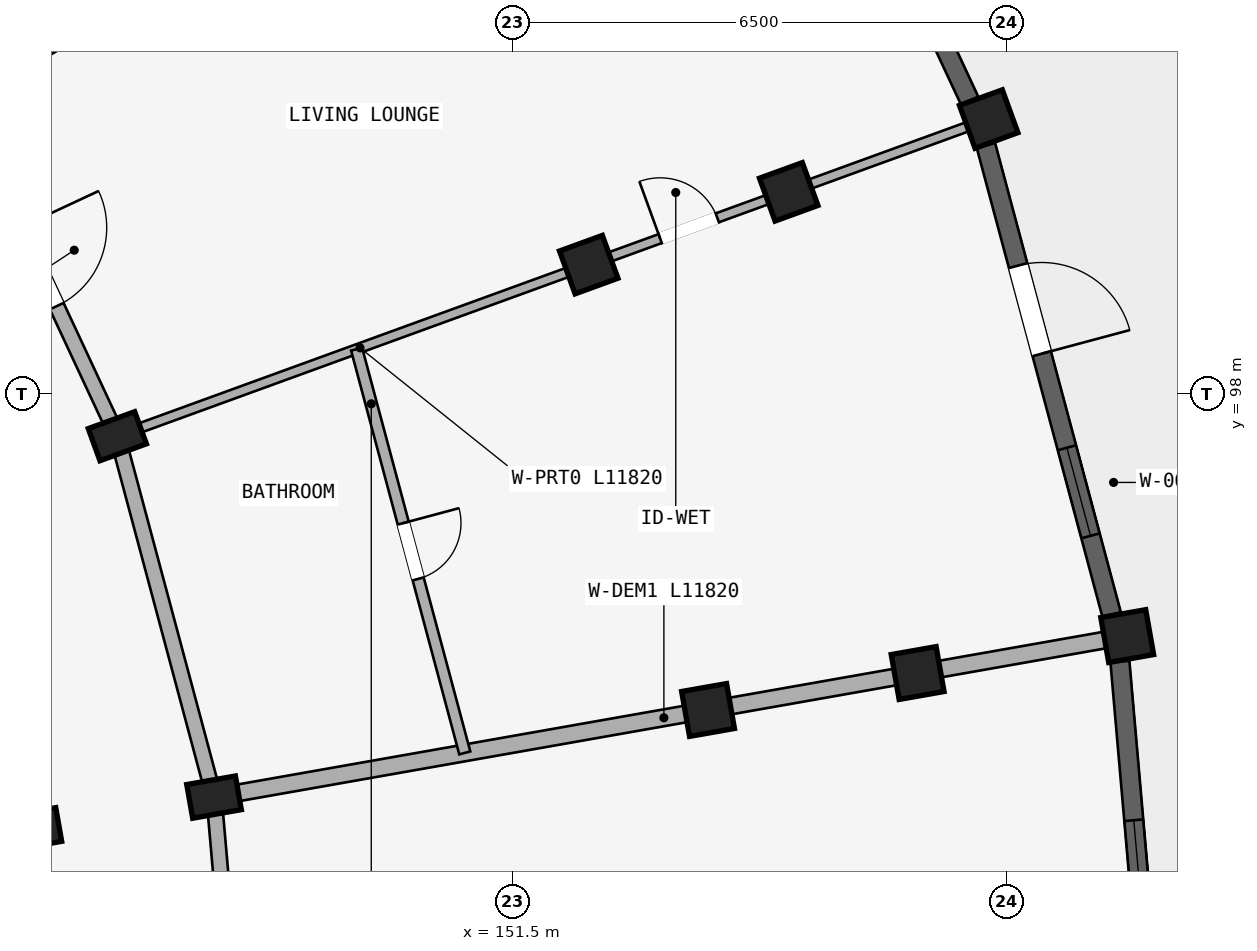
"""IFC4 building model, lengths in metres.
Left out: names, types, materials, properties, quantities, classifications, styles, units other than length and angle.
Written with IfcOpenShell. Run it as: python <this file> out.ifc"""

import sys

from ifc_helpers import new_model, si_unit, direction, frame, frame_2d, origin, origin_2d, place, context, subcontext, project, spatial, rectangle, extrude, element, fill, save


model = new_model("IFC4")
c1 = context("Model", 3, precision=1e-05, world=origin(), true_north=direction((0.0, 1.0)))
c2 = subcontext(c1, "Body", "Model", "MODEL_VIEW")
j1 = project(units=[si_unit("LENGTHUNIT", "METRE"), si_unit("PLANEANGLEUNIT", "RADIAN")], contexts=[c1])
p1 = place(None, origin())
s1 = spatial("IfcSite", under=j1, at=p1, CompositionType="ELEMENT")
p2 = place(p1, origin())
s2 = spatial("IfcBuilding", under=s1, at=p2, CompositionType="ELEMENT")
p3 = place(p2, frame((0.0, 0.0, 33.9)))
s3 = spatial("IfcBuildingStorey", under=s2, at=p3, CompositionType="ELEMENT", Elevation=33.9)
p4 = place(p3, frame((146.299, 97.445, 0.0), z_axis=(0.0, 0.0, 1.0), x_axis=(-0.342020143326, 0.939692620786, 0.0)))
e1 = element("IfcColumn", 1, at=p4, inside=s3, PredefinedType="COLUMN", context=c2, shape_type="SweptSolid", body=[
    extrude(rectangle(XDim=0.45, YDim=0.65, at=origin_2d()), origin(), (0.0, 0.0, 1.0), 2.93),
])
for number, where, z_axis, x_axis in (
    (2, (152.501, 99.702, 0.0), (0.0, 0.0, 1.0), (-0.342, 0.94, 0.0)),
    (3, (155.132, 100.66, 0.0), (0.0, 0.0, 1.0), (-0.342, 0.94, 0.0)),
):
    element("IfcColumn", number, at=place(p3, frame(where, z_axis=z_axis, x_axis=x_axis)), inside=s3, PredefinedType="COLUMN", context=c2, shape_type="SweptSolid", body=[
        extrude(rectangle(XDim=0.6, YDim=0.6, at=origin_2d()), origin(), (0.0, 0.0, 1.0), 2.93),
    ])
p5 = place(p3, frame((157.764, 101.618, 0.0), z_axis=(0.0, 0.0, 1.0), x_axis=(-0.342020143326, 0.939692620786, 0.0)))
e4 = element("IfcColumn", 4, at=p5, inside=s3, PredefinedType="COLUMN", context=c2, shape_type="SweptSolid", body=[
    extrude(rectangle(XDim=0.6, YDim=0.6, at=origin_2d()), origin(), (0.0, 0.0, 1.0), 2.97),
])
for number, where, z_axis, x_axis in (
    (5, (145.208, 92.28, 0.0), (0.0, 0.0, 1.0), (-0.174, 0.985, 0.0)),
    (6, (147.572, 92.697, 0.0), (0.0, 0.0, 1.0), (-0.174, 0.985, 0.0)),
):
    element("IfcColumn", number, at=place(p3, frame(where, z_axis=z_axis, x_axis=x_axis)), inside=s3, PredefinedType="COLUMN", context=c2, shape_type="SweptSolid", body=[
        extrude(rectangle(XDim=0.45, YDim=0.65, at=origin_2d()), origin(), (0.0, 0.0, 1.0), 2.93),
    ])
for number, where, z_axis, x_axis in (
    (7, (154.071, 93.843, 0.0), (0.0, 0.0, 1.0), (-0.174, 0.985, 0.0)),
    (8, (156.829, 94.329, 0.0), (0.0, 0.0, 1.0), (-0.174, 0.985, 0.0)),
):
    element("IfcColumn", number, at=place(p3, frame(where, z_axis=z_axis, x_axis=x_axis)), inside=s3, PredefinedType="COLUMN", context=c2, shape_type="SweptSolid", body=[
        extrude(rectangle(XDim=0.6, YDim=0.6, at=origin_2d()), origin(), (0.0, 0.0, 1.0), 2.93),
    ])
p6 = place(p3, frame((159.586, 94.815, 0.0), z_axis=(0.0, 0.0, 1.0), x_axis=(-0.173648177667, 0.984807753012, 0.0)))
e9 = element("IfcColumn", 9, at=p6, inside=s3, PredefinedType="COLUMN", context=c2, shape_type="SweptSolid", body=[
    extrude(rectangle(XDim=0.6, YDim=0.6, at=origin_2d()), origin(), (0.0, 0.0, 1.0), 2.97),
])
p7 = place(p3, frame((144.222, 101.9, 0.0), z_axis=(0.0, 0.0, 1.0), x_axis=(0.422629854778, -0.906302381024, 0.0)))
e10 = element("IfcWall", 10, at=p7, inside=s3, PredefinedType="STANDARD", context=c2, shape_type="SweptSolid", body=[
    extrude(rectangle(XDim=4.915, YDim=0.2, at=frame_2d((2.458, 0.0))), origin(), (0.0, 0.0, 1.0), 2.372),
])
p8 = place(p7, frame((1.888, 0.0, 0.0)))
e11 = element("IfcOpeningElement", 11, at=p8, cuts=e10, PredefinedType="OPENING", context=c2, shape_type="SweptSolid", body=[
    extrude(rectangle(XDim=1.14, YDim=2.15, at=frame_2d((0.57, 1.075))), frame((0.0, 0.11, 0.0), z_axis=(0.0, -1.0, 0.0), x_axis=(1.0, 0.0, 0.0)), (0.0, 0.0, 1.0), 0.22),
])
p9 = place(p3, frame((146.299, 97.445, 0.0), z_axis=(0.0, 0.0, 1.0), x_axis=(0.258803112091, -0.965930095386, 0.0)))
e12 = element("IfcWall", 12, at=p9, inside=s3, PredefinedType="STANDARD", context=c2, shape_type="SweptSolid", body=[
    extrude(rectangle(XDim=4.916, YDim=0.2, at=frame_2d((2.458, 0.0))), origin(), (0.0, 0.0, 1.0), 2.372),
])
p10 = place(p3, frame((145.208, 92.28, 0.0), z_axis=(0.0, 0.0, 1.0), x_axis=(0.087187153726, -0.996191949488, 0.0)))
e13 = element("IfcWall", 13, at=p10, inside=s3, PredefinedType="STANDARD", context=c2, shape_type="SweptSolid", body=[
    extrude(rectangle(XDim=4.497, YDim=0.2, at=frame_2d((2.249, 0.0))), origin(), (0.0, 0.0, 1.0), 2.372),
])
p11 = place(p3, frame((147.572, 92.697, 0.0), z_axis=(0.0, 0.0, 1.0), x_axis=(0.087167566415, -0.996193663584, 0.0)))
e14 = element("IfcWall", 14, at=p11, inside=s3, PredefinedType="STANDARD", context=c2, shape_type="SweptSolid", body=[
    extrude(rectangle(XDim=4.916, YDim=0.2, at=frame_2d((2.458, 0.0))), origin(), (0.0, 0.0, 1.0), 2.372),
])
p12 = place(p11, frame((1.958, 0.0, 0.0)))
e15 = element("IfcOpeningElement", 15, at=p12, cuts=e14, PredefinedType="OPENING", context=c2, shape_type="SweptSolid", body=[
    extrude(rectangle(XDim=1.0, YDim=2.15, at=frame_2d((0.5, 1.075))), frame((0.0, 0.11, 0.0), z_axis=(0.0, -1.0, 0.0), x_axis=(1.0, 0.0, 0.0)), (0.0, 0.0, 1.0), 0.22),
])
p13 = place(p3, frame((144.309, 101.95, 0.0), z_axis=(0.0, 0.0, 1.0), x_axis=(0.866017730655, 0.500013290014, 0.0)))
e16 = element("IfcWall", 16, at=p13, inside=s3, PredefinedType="STANDARD", context=c2, shape_type="SweptSolid", body=[
    extrude(rectangle(XDim=11.82, YDim=0.22, at=frame_2d((5.91, 0.0))), origin(), (0.0, 0.0, 1.0), 2.372),
])
p14 = place(p3, frame((146.393, 97.479, 0.0), z_axis=(0.0, 0.0, 1.0), x_axis=(0.939698102693, 0.342005081534, 0.0)))
e17 = element("IfcWall", 17, at=p14, inside=s3, PredefinedType="PARTITIONING", context=c2, shape_type="SweptSolid", body=[
    extrude(rectangle(XDim=11.82, YDim=0.125, at=frame_2d((5.91, 0.0))), origin(), (0.0, 0.0, 1.0), 2.372),
])
p15 = place(p14, frame((7.5, 0.0, 0.0)))
e18 = element("IfcOpeningElement", 18, at=p15, cuts=e17, PredefinedType="OPENING", context=c2, shape_type="SweptSolid", body=[
    extrude(rectangle(XDim=0.8, YDim=2.1, at=frame_2d((0.4, 1.05))), frame((0.0, 0.073, 0.0), z_axis=(0.0, -1.0, 0.0), x_axis=(1.0, 0.0, 0.0)), (0.0, 0.0, 1.0), 0.145),
])
p16 = place(p3, frame((147.67, 92.714, 0.0), z_axis=(0.0, 0.0, 1.0), x_axis=(0.984808085438, 0.173646292378, 0.0)))
e19 = element("IfcWall", 19, at=p16, inside=s3, PredefinedType="STANDARD", context=c2, shape_type="SweptSolid", body=[
    extrude(rectangle(XDim=11.82, YDim=0.22, at=frame_2d((5.91, 0.0))), origin(), (0.0, 0.0, 1.0), 2.372),
])
p17 = place(p3, frame((149.447, 98.591, 0.0), z_axis=(0.0, 0.0, 1.0), x_axis=(0.258806351229, -0.965929227513, 0.0)))
e20 = element("IfcWall", 20, at=p17, inside=s3, PredefinedType="PLUMBINGWALL", context=c2, shape_type="SweptSolid", body=[
    extrude(rectangle(XDim=5.5, YDim=0.15, at=frame_2d((2.75, 0.0))), origin(), (0.0, 0.0, 1.0), 2.372),
])
p18 = place(p17, frame((2.37, 0.0, 0.0)))
e21 = element("IfcOpeningElement", 21, at=p18, cuts=e20, PredefinedType="OPENING", context=c2, shape_type="SweptSolid", body=[
    extrude(rectangle(XDim=0.76, YDim=2.05, at=frame_2d((0.38, 1.025))), frame((0.0, 0.085, 0.0), z_axis=(0.0, -1.0, 0.0), x_axis=(1.0, 0.0, 0.0)), (0.0, 0.0, 1.0), 0.17),
])
p19 = place(p3, frame((154.812, 107.652, 0.0), z_axis=(0.0, 0.0, 1.0), x_axis=(0.422613580495, -0.906309969922, 0.0)))
e22 = element("IfcWall", 22, at=p19, inside=s3, PredefinedType="STANDARD", context=c2, shape_type="SweptSolid", body=[
    extrude(rectangle(XDim=6.391, YDim=0.25, at=frame_2d((3.196, 0.0))), origin(), (0.0, 0.0, 1.0), 2.48),
])
p20 = place(p19, frame((2.245, 0.0, 0.53)))
e23 = element("IfcOpeningElement", 23, at=p20, cuts=e22, PredefinedType="OPENING", context=c2, shape_type="SweptSolid", body=[
    extrude(rectangle(XDim=1.9, YDim=1.75, at=frame_2d((0.95, 0.875))), frame((0.0, 0.135, 0.0), z_axis=(0.0, -1.0, 0.0), x_axis=(1.0, 0.0, 0.0)), (0.0, 0.0, 1.0), 0.27),
])
p21 = place(p3, frame((157.727, 101.271, 0.0), z_axis=(0.0, 0.0, 1.0), x_axis=(0.258815647274, -0.965926736728, 0.0)))
e24 = element("IfcWall", 24, at=p21, inside=s3, PredefinedType="STANDARD", context=c2, shape_type="SweptSolid", body=[
    extrude(rectangle(XDim=6.391, YDim=0.25, at=frame_2d((3.195, 0.0))), origin(), (0.0, 0.0, 1.0), 2.48),
])
p22 = place(p21, frame((4.118, 0.0, 0.63)))
e25 = element("IfcOpeningElement", 25, at=p22, cuts=e24, PredefinedType="OPENING", context=c2, shape_type="SweptSolid", body=[
    extrude(rectangle(XDim=1.2, YDim=1.5, at=frame_2d((0.6, 0.75))), frame((0.0, 0.135, 0.0), z_axis=(0.0, -1.0, 0.0), x_axis=(1.0, 0.0, 0.0)), (0.0, 0.0, 1.0), 0.27),
])
p23 = place(p21, frame((1.637, 0.0, 0.0)))
e26 = element("IfcOpeningElement", 26, at=p23, cuts=e24, PredefinedType="OPENING", context=c2, shape_type="SweptSolid", body=[
    extrude(rectangle(XDim=1.2, YDim=2.15, at=frame_2d((0.6, 1.075))), frame((0.0, 0.135, 0.0), z_axis=(0.0, -1.0, 0.0), x_axis=(1.0, 0.0, 0.0)), (0.0, 0.0, 1.0), 0.27),
])
p24 = place(p3, frame((159.49, 94.48, 0.0), z_axis=(0.0, 0.0, 1.0), x_axis=(0.087176902101, -0.996192846662, 0.0)))
e27 = element("IfcWall", 27, at=p24, inside=s3, PredefinedType="STANDARD", context=c2, shape_type="SweptSolid", body=[
    extrude(rectangle(XDim=6.391, YDim=0.25, at=frame_2d((3.195, 0.0))), origin(), (0.0, 0.0, 1.0), 2.48),
])
p25 = place(p24, frame((2.095, 0.0, 0.38)))
e28 = element("IfcOpeningElement", 28, at=p25, cuts=e27, PredefinedType="OPENING", context=c2, shape_type="SweptSolid", body=[
    extrude(rectangle(XDim=2.2, YDim=1.9, at=frame_2d((1.1, 0.95))), frame((0.0, 0.135, 0.0), z_axis=(0.0, -1.0, 0.0), x_axis=(1.0, 0.0, 0.0)), (0.0, 0.0, 1.0), 0.27),
])
p26 = place(p22, origin())
e29 = element("IfcWindow", 29, at=p26, inside=s3, PartitioningType="SINGLE_PANEL", PredefinedType="WINDOW", context=c2, shape_type="SweptSolid", body=[
    extrude(rectangle(XDim=1.2, YDim=1.5, at=frame_2d((0.6, 0.75))), frame((0.0, 0.03, 0.0), z_axis=(0.0, -1.0, 0.0), x_axis=(1.0, 0.0, 0.0)), (0.0, 0.0, 1.0), 0.06),
])
fill(e25, e29)
p27 = place(p25, origin())
e30 = element("IfcWindow", 30, at=p27, inside=s3, PartitioningType="TRIPLE_PANEL_VERTICAL", PredefinedType="WINDOW", context=c2, shape_type="SweptSolid", body=[
    extrude(rectangle(XDim=2.2, YDim=1.9, at=frame_2d((1.1, 0.95))), frame((0.0, 0.03, 0.0), z_axis=(0.0, -1.0, 0.0), x_axis=(1.0, 0.0, 0.0)), (0.0, 0.0, 1.0), 0.06),
])
fill(e28, e30)
p28 = place(p15, frame((0.8, 0.0, 0.0), z_axis=(0.0, 0.0, 1.0), x_axis=(-1.0, 0.0, 0.0)))
e31 = element("IfcDoor", 31, at=p28, inside=s3, OperationType="SINGLE_SWING_RIGHT", PredefinedType="DOOR", context=c2, shape_type="SweptSolid", body=[
    extrude(rectangle(XDim=0.8, YDim=2.1, at=frame_2d((0.4, 1.05))), frame((0.0, 0.025, 0.0), z_axis=(0.0, -1.0, 0.0), x_axis=(1.0, 0.0, 0.0)), (0.0, 0.0, 1.0), 0.05),
])
fill(e18, e31)
p29 = place(p8, frame((1.14, 0.0, 0.0), z_axis=(0.0, 0.0, 1.0), x_axis=(-1.0, 0.0, 0.0)))
e32 = element("IfcDoor", 32, at=p29, inside=s3, OperationType="SINGLE_SWING_RIGHT", PredefinedType="DOOR", context=c2, shape_type="SweptSolid", body=[
    extrude(rectangle(XDim=1.14, YDim=2.15, at=frame_2d((0.57, 1.075))), frame((0.0, 0.025, 0.0), z_axis=(0.0, -1.0, 0.0), x_axis=(1.0, 0.0, 0.0)), (0.0, 0.0, 1.0), 0.05),
])
fill(e11, e32)
p30 = place(p18, origin())
e33 = element("IfcDoor", 33, at=p30, inside=s3, OperationType="SINGLE_SWING_LEFT", PredefinedType="DOOR", context=c2, shape_type="SweptSolid", body=[
    extrude(rectangle(XDim=0.76, YDim=2.05, at=frame_2d((0.38, 1.025))), frame((0.0, 0.025, 0.0), z_axis=(0.0, -1.0, 0.0), x_axis=(1.0, 0.0, 0.0)), (0.0, 0.0, 1.0), 0.05),
])
fill(e21, e33)
p31 = place(p23, origin())
e34 = element("IfcDoor", 34, at=p31, inside=s3, OperationType="SINGLE_SWING_RIGHT", PredefinedType="DOOR", context=c2, shape_type="SweptSolid", body=[
    extrude(rectangle(XDim=1.2, YDim=2.15, at=frame_2d((0.6, 1.075))), frame((0.0, 0.025, 0.0), z_axis=(0.0, -1.0, 0.0), x_axis=(1.0, 0.0, 0.0)), (0.0, 0.0, 1.0), 0.05),
])
fill(e26, e34)
save(model, sys.argv[1])
